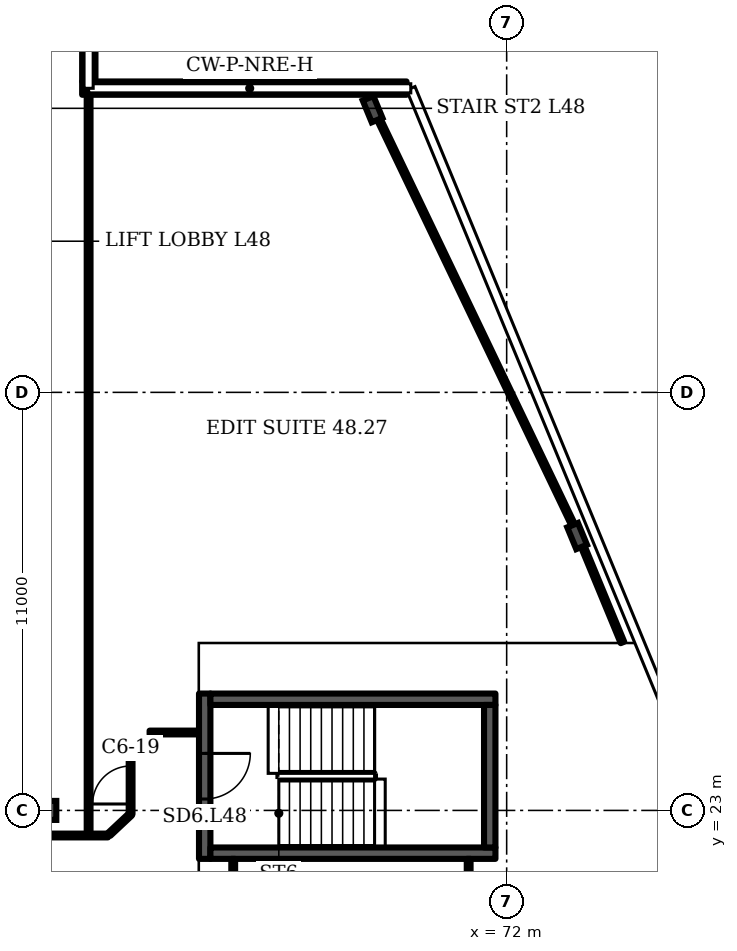
"""IFC4 building model, lengths in metres.
Left out: names, types, materials, properties, quantities, classifications, styles, units other than length and angle.
Written with IfcOpenShell. Run it as: python <this file> out.ifc"""

import sys

from ifc_helpers import new_model, si_unit, direction, frame, frame_2d, origin, origin_2d, place, context, subcontext, project, spatial, rectangle, i_section, extrude, element, fill, save


model = new_model("IFC4")
c1 = context("Model", 3, precision=1e-05, world=origin(), true_north=direction((0.0, 1.0)))
c2 = subcontext(c1, "Body", "Model", "MODEL_VIEW")
j1 = project(units=[si_unit("LENGTHUNIT", "METRE"), si_unit("PLANEANGLEUNIT", "RADIAN")], contexts=[c1])
p1 = place(None, origin())
s1 = spatial("IfcSite", under=j1, at=p1, CompositionType="ELEMENT")
p2 = place(p1, origin())
s2 = spatial("IfcBuilding", under=s1, at=p2, CompositionType="ELEMENT")
p3 = place(p2, frame((0.0, 0.0, 195.1)))
s3 = spatial("IfcBuildingStorey", under=s2, at=p3, CompositionType="ELEMENT", Elevation=195.1)
for number, where, z_axis, x_axis in (
    (1, (73.854, 30.219, 0.0), (0.0, 0.0, 1.0), (0.924, 0.382, 0.0)),
    (2, (68.472, 41.45, 0.0), (0.0, 0.0, 1.0), (0.924, 0.382, 0.0)),
):
    element("IfcColumn", number, at=place(p3, frame(where, z_axis=z_axis, x_axis=x_axis)), inside=s3, PredefinedType="COLUMN", context=c2, shape_type="SweptSolid", body=[
        extrude(i_section(OverallWidth=0.305, OverallDepth=0.62, WebThickness=0.021, FlangeThickness=0.04, FilletRadius=0.027, at=origin_2d()), origin(), (0.0, 0.0, 1.0), 3.6),
    ])
p4 = place(p3, frame((60.0, 23.0, 0.0), z_axis=(0.0, 0.0, 1.0), x_axis=(1.0, 0.0, 0.0)))
e3 = element("IfcColumn", 3, at=p4, inside=s3, PredefinedType="COLUMN", context=c2, shape_type="SweptSolid", body=[
    extrude(i_section(OverallWidth=0.3, OverallDepth=0.5, WebThickness=0.014, FlangeThickness=0.028, FilletRadius=0.027, at=origin_2d()), origin(), (0.0, 0.0, 1.0), 3.6),
])
p5 = place(p3, frame((69.366, 42.005, 0.0), z_axis=(0.0, 0.0, 1.0), x_axis=(-1.0, 0.0, 0.0)))
e4 = element("IfcWall", 4, at=p5, inside=s3, PredefinedType="SOLIDWALL", context=c2, shape_type="SweptSolid", body=[
    extrude(rectangle(XDim=8.536, YDim=0.35, at=frame_2d((4.268, 0.0))), origin(), (0.0, 0.0, 1.0), 1.0),
])
p6 = place(p3, frame((61.005, 42.18, 0.0), z_axis=(0.0, 0.0, 1.0), x_axis=(0.0, 1.0, 0.0)))
e5 = element("IfcWall", 5, at=p6, inside=s3, PredefinedType="SOLIDWALL", context=c2, shape_type="SweptSolid", body=[
    extrude(rectangle(XDim=1.97, YDim=0.35, at=frame_2d((0.985, 0.0))), origin(), (0.0, 0.0, 1.0), 1.0),
])
p7 = place(p3, frame((64.055, 21.725, 0.0), z_axis=(0.0, 0.0, 1.0), x_axis=(0.0, 1.0, 0.0)))
e6 = element("IfcWall", 6, at=p7, inside=s3, PredefinedType="SHEAR", context=c2, shape_type="SweptSolid", body=[
    extrude(rectangle(XDim=4.35, YDim=0.3, at=frame_2d((2.175, 0.0))), origin(), (0.0, 0.0, 1.0), 3.2),
])
p8 = place(p7, frame((1.575, 0.0, 0.0)))
e7 = element("IfcOpeningElement", 7, at=p8, cuts=e6, PredefinedType="OPENING", context=c2, shape_type="SweptSolid", body=[
    extrude(rectangle(XDim=1.2, YDim=2.1, at=frame_2d((0.6, 1.05))), frame((0.0, 0.16, 0.0), z_axis=(0.0, -1.0, 0.0), x_axis=(1.0, 0.0, 0.0)), (0.0, 0.0, 1.0), 0.32),
])
p9 = place(p3, frame((18.955, 22.34, 0.0), z_axis=(0.0, 0.0, 1.0), x_axis=(1.0, 0.0, 0.0)))
e8 = element("IfcWall", 8, at=p9, inside=s3, PredefinedType="PARTITIONING", context=c2, shape_type="SweptSolid", body=[
    extrude(rectangle(XDim=42.555, YDim=0.1, at=frame_2d((21.277, 0.0))), origin(), (0.0, 0.0, 1.0), 3.2),
])
p10 = place(p9, frame((0.62, 0.0, 0.0)))
e9 = element("IfcOpeningElement", 9, at=p10, cuts=e8, PredefinedType="OPENING", context=c2, shape_type="SweptSolid", body=[
    extrude(rectangle(XDim=1.0, YDim=2.1, at=frame_2d((0.5, 1.05))), frame((0.0, 0.06, 0.0), z_axis=(0.0, -1.0, 0.0), x_axis=(1.0, 0.0, 0.0)), (0.0, 0.0, 1.0), 0.12),
])
p11 = place(p9, frame((8.62, 0.0, 0.0)))
e10 = element("IfcOpeningElement", 10, at=p11, cuts=e8, PredefinedType="OPENING", context=c2, shape_type="SweptSolid", body=[
    extrude(rectangle(XDim=1.0, YDim=2.1, at=frame_2d((0.5, 1.05))), frame((0.0, 0.06, 0.0), z_axis=(0.0, -1.0, 0.0), x_axis=(1.0, 0.0, 0.0)), (0.0, 0.0, 1.0), 0.12),
])
p12 = place(p3, frame((61.0, 22.34, 0.0), z_axis=(0.0, 0.0, 1.0), x_axis=(0.0, 1.0, 0.0)))
e11 = element("IfcWall", 11, at=p12, inside=s3, PredefinedType="PARTITIONING", context=c2, shape_type="SweptSolid", body=[
    extrude(rectangle(XDim=19.64, YDim=0.1, at=frame_2d((9.82, 0.0))), origin(), (0.0, 0.0, 1.0), 3.2),
])
p13 = place(p3, frame((61.54, 22.37, 0.0), z_axis=(0.0, 0.0, 1.0), x_axis=(0.72944, 0.684047, 0.0)))
e12 = element("IfcWall", 12, at=p13, inside=s3, PredefinedType="PARTITIONING", context=c2, shape_type="SweptSolid", body=[
    extrude(rectangle(XDim=0.774, YDim=0.1, at=frame_2d((0.387, 0.0))), origin(), (0.0, 0.0, 1.0), 3.2),
])
p14 = place(p3, frame((62.105, 22.9, 0.0), z_axis=(0.0, 0.0, 1.0), x_axis=(0.0, 1.0, 0.0)))
e13 = element("IfcWall", 13, at=p14, inside=s3, PredefinedType="PARTITIONING", context=c2, shape_type="SweptSolid", body=[
    extrude(rectangle(XDim=1.9, YDim=0.1, at=frame_2d((0.95, 0.0))), origin(), (0.0, 0.0, 1.0), 3.2),
])
p15 = place(p14, frame((0.269, 0.0, 0.0)))
e14 = element("IfcOpeningElement", 14, at=p15, cuts=e13, PredefinedType="OPENING", context=c2, shape_type="SweptSolid", body=[
    extrude(rectangle(XDim=1.0, YDim=2.1, at=frame_2d((0.5, 1.05))), frame((0.0, 0.06, 0.0), z_axis=(0.0, -1.0, 0.0), x_axis=(1.0, 0.0, 0.0)), (0.0, 0.0, 1.0), 0.12),
])
p16 = place(p3, frame((62.105, 24.8, 0.0), z_axis=(0.0, 0.0, 1.0), x_axis=(1.0, 0.0, 0.0)))
e15 = element("IfcWall", 15, at=p16, inside=s3, PredefinedType="PARTITIONING", context=c2, shape_type="SweptSolid", body=[
    extrude(rectangle(XDim=0.38, YDim=0.1, at=frame_2d((0.19, 0.0))), origin(), (0.0, 0.0, 1.0), 3.2),
])
p17 = place(p3, frame((62.605, 25.05, 0.0), z_axis=(0.0, 0.0, 1.0), x_axis=(1.0, 0.0, 0.0)))
e16 = element("IfcWall", 16, at=p17, inside=s3, PredefinedType="PARTITIONING", context=c2, shape_type="SweptSolid", body=[
    extrude(rectangle(XDim=1.28, YDim=0.1, at=frame_2d((0.64, 0.0))), origin(), (0.0, 0.0, 1.0), 3.2),
])
p18 = place(p3, frame((64.805, 14.305, 0.0), z_axis=(0.0, 0.0, 1.0), x_axis=(0.0, 1.0, 0.0)))
e17 = element("IfcWall", 17, at=p18, inside=s3, PredefinedType="PARTITIONING", context=c2, shape_type="SweptSolid", body=[
    extrude(rectangle(XDim=7.42, YDim=0.1, at=frame_2d((3.71, 0.0))), origin(), (0.0, 0.0, 1.0), 3.2),
])
p19 = place(p3, frame((71.0, 10.325, 0.0), z_axis=(0.0, 0.0, 1.0), x_axis=(0.0, 1.0, 0.0)))
e18 = element("IfcWall", 18, at=p19, inside=s3, PredefinedType="PARTITIONING", context=c2, shape_type="SweptSolid", body=[
    extrude(rectangle(XDim=11.4, YDim=0.1, at=frame_2d((5.7, 0.0))), origin(), (0.0, 0.0, 1.0), 3.2),
])
p20 = place(p3, frame((73.885, 30.23, 0.0), z_axis=(0.0, 0.0, 1.0), x_axis=(-0.432107, 0.901822, 0.0)))
e19 = element("IfcWall", 19, at=p20, inside=s3, PredefinedType="PARTITIONING", context=c2, shape_type="SweptSolid", body=[
    extrude(rectangle(XDim=13.016, YDim=0.1, at=frame_2d((6.508, 0.0))), origin(), (0.0, 0.0, 1.0), 2.58),
])
p21 = place(p3, frame((75.047, 27.42, 0.0), z_axis=(0.0, 0.0, 1.0), x_axis=(-0.382024, 0.924148, 0.0)))
e20 = element("IfcWall", 20, at=p21, inside=s3, PredefinedType="PARTITIONING", context=c2, shape_type="SweptSolid", body=[
    extrude(rectangle(XDim=3.041, YDim=0.1, at=frame_2d((1.521, 0.0))), origin(), (0.0, 0.0, 1.0), 2.58),
])
for number, where, z_axis, x_axis in (
    (21, (64.205, 21.875, 0.0), (0.0, 0.0, 1.0), (1.0, 0.0, 0.0)),
    (22, (64.205, 25.925, 0.0), (0.0, 0.0, 1.0), (1.0, 0.0, 0.0)),
):
    element("IfcWall", number, at=place(p3, frame(where, z_axis=z_axis, x_axis=x_axis)), inside=s3, PredefinedType="SHEAR", context=c2, shape_type="SweptSolid", body=[
        extrude(rectangle(XDim=7.5, YDim=0.3, at=frame_2d((3.75, 0.0))), origin(), (0.0, 0.0, 1.0), 3.2),
    ])
p22 = place(p3, frame((71.555, 22.025, 0.0), z_axis=(0.0, 0.0, 1.0), x_axis=(0.0, 1.0, 0.0)))
e23 = element("IfcWall", 23, at=p22, inside=s3, PredefinedType="SHEAR", context=c2, shape_type="SweptSolid", body=[
    extrude(rectangle(XDim=3.75, YDim=0.3, at=frame_2d((1.875, 0.0))), origin(), (0.0, 0.0, 1.0), 3.2),
])
p23 = place(p8, origin())
e24 = element("IfcDoor", 24, at=p23, inside=s3, OperationType="SINGLE_SWING_RIGHT", PredefinedType="DOOR", context=c2, shape_type="SweptSolid", body=[
    extrude(rectangle(XDim=1.2, YDim=2.1, at=frame_2d((0.6, 1.05))), frame((0.0, 0.025, 0.0), z_axis=(0.0, -1.0, 0.0), x_axis=(1.0, 0.0, 0.0)), (0.0, 0.0, 1.0), 0.05),
])
fill(e7, e24)
p24 = place(p15, origin())
e25 = element("IfcDoor", 25, at=p24, inside=s3, OperationType="SINGLE_SWING_LEFT", PredefinedType="DOOR", context=c2, shape_type="SweptSolid", body=[
    extrude(rectangle(XDim=1.0, YDim=2.1, at=frame_2d((0.5, 1.05))), frame((0.0, 0.025, 0.0), z_axis=(0.0, -1.0, 0.0), x_axis=(1.0, 0.0, 0.0)), (0.0, 0.0, 1.0), 0.05),
])
fill(e14, e25)
save(model, sys.argv[1])
